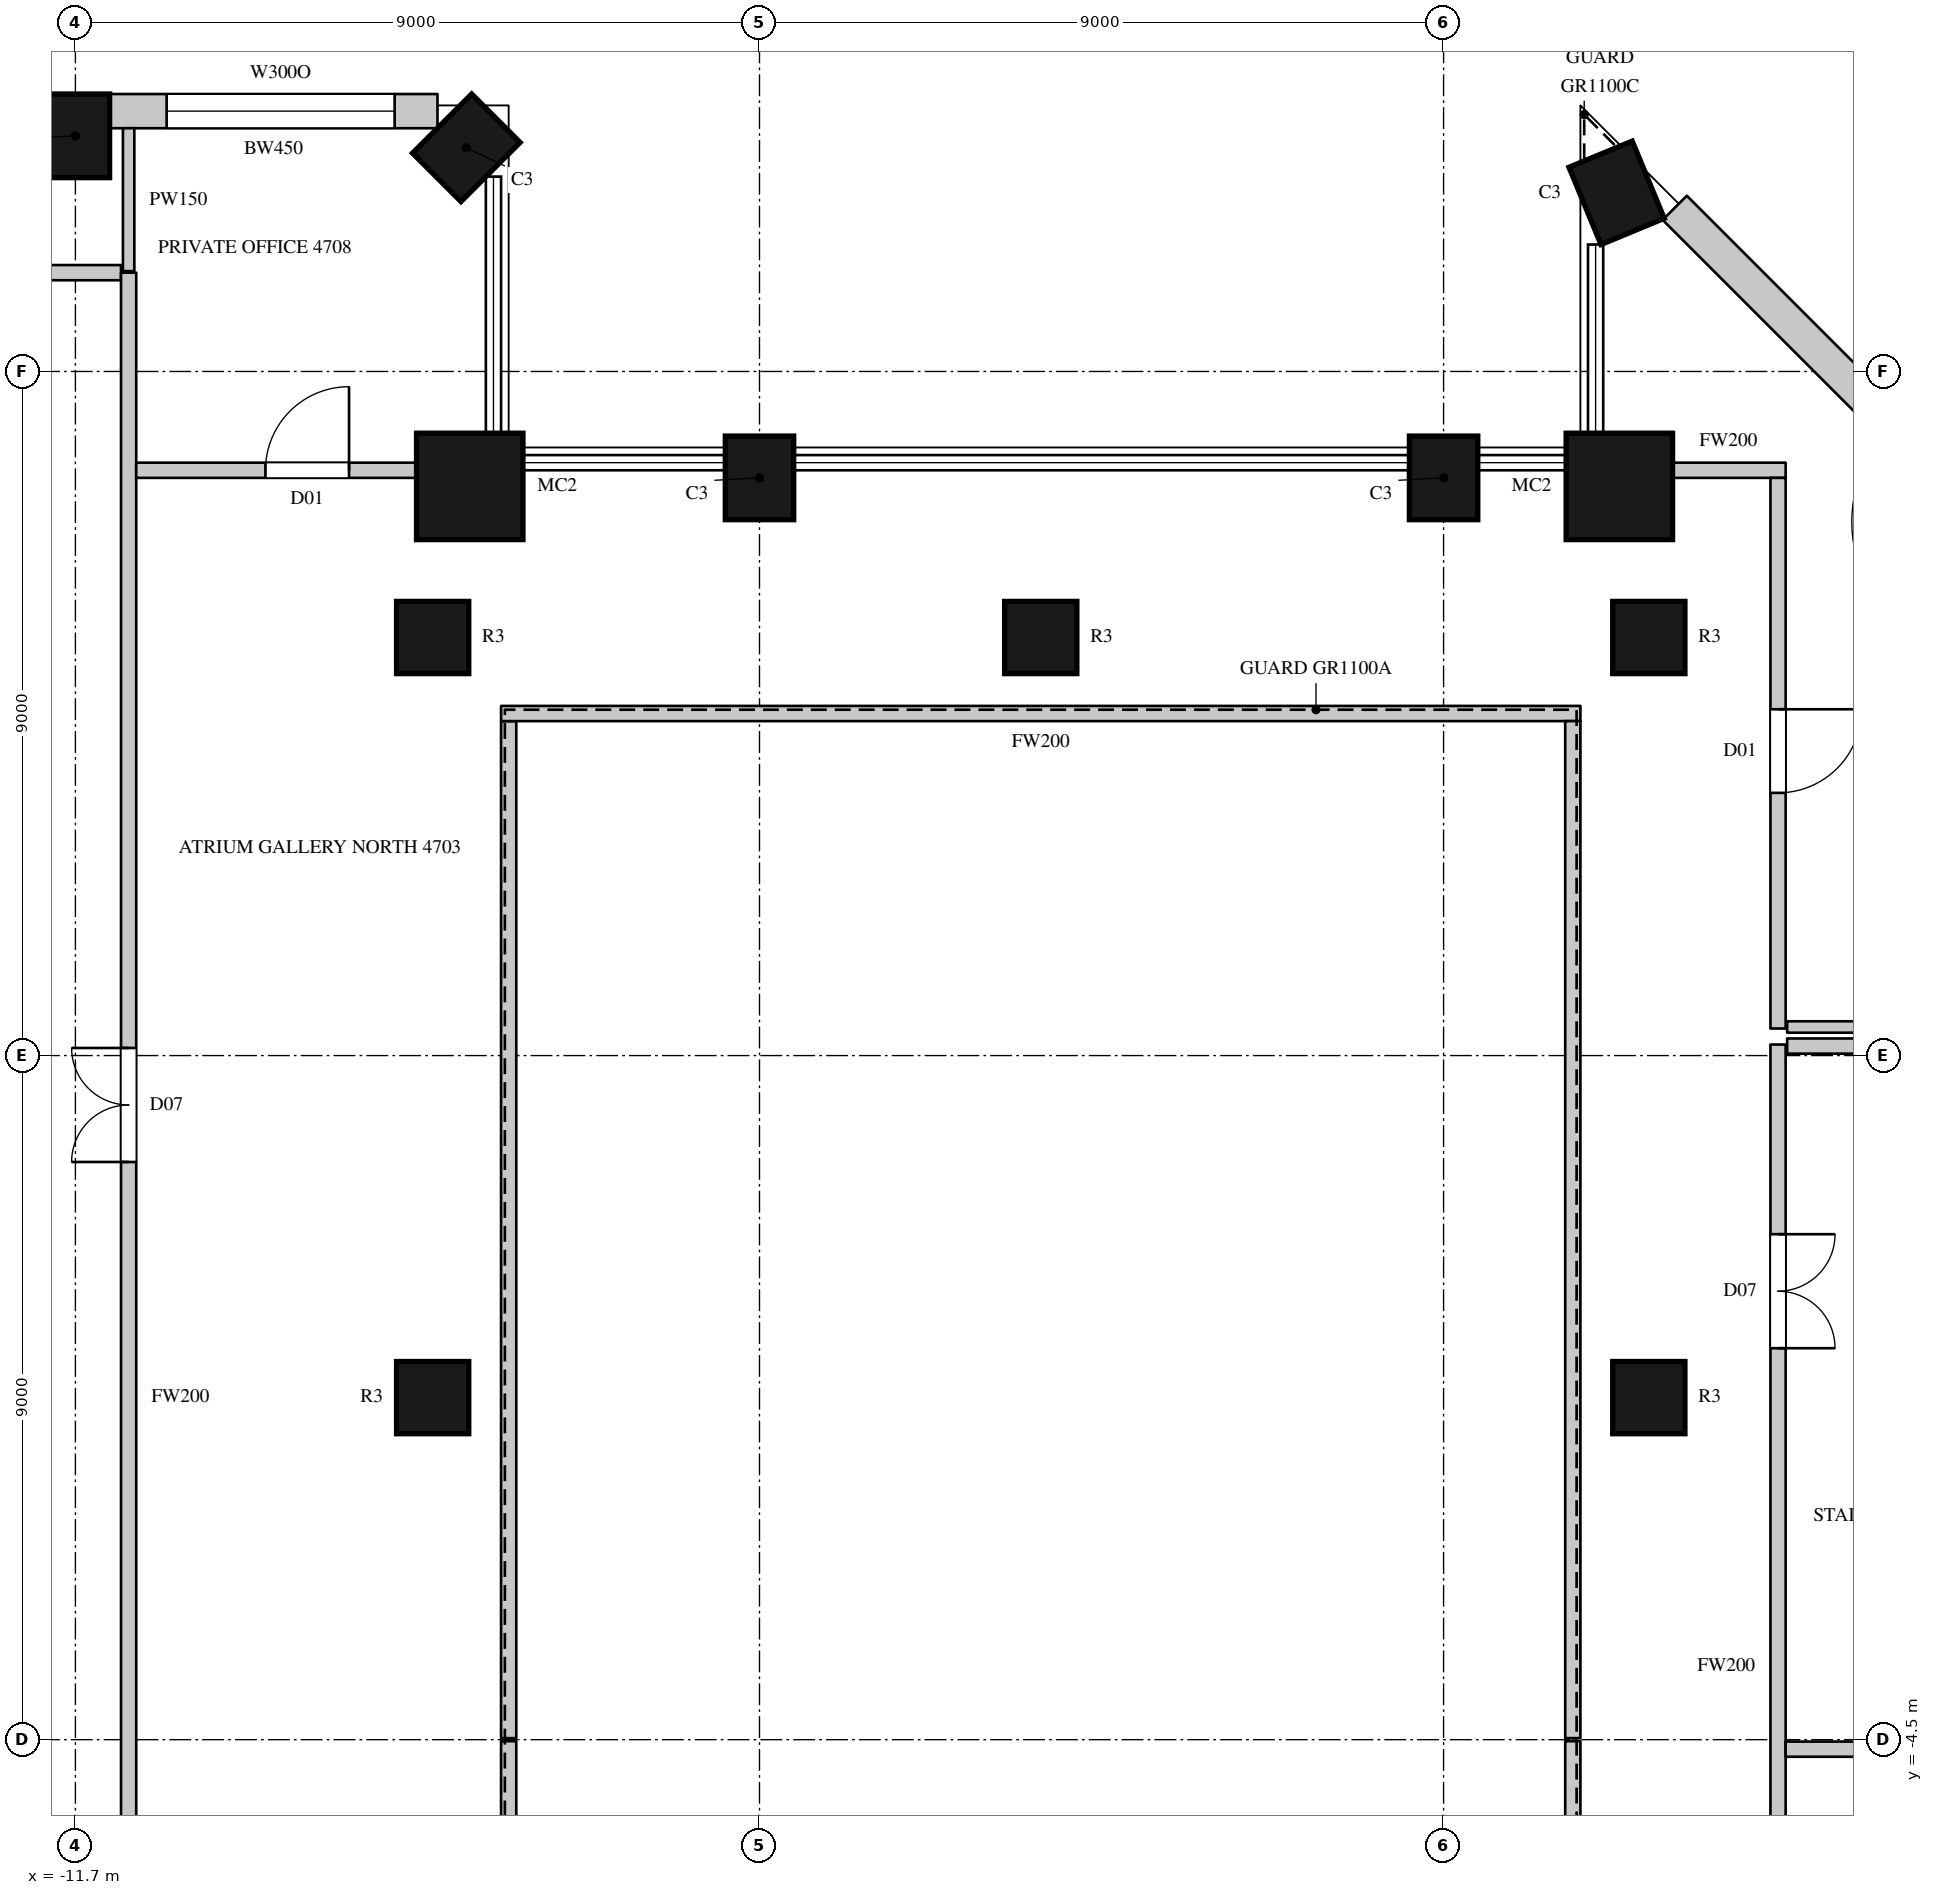
"""IFC4 building model, lengths in metres.
Left out: names, types, materials, properties, quantities, classifications, styles, units other than length and angle.
Written with IfcOpenShell. Run it as: python <this file> out.ifc"""

import sys

from ifc_helpers import new_model, si_unit, direction, frame, frame_2d, origin, origin_2d, place, context, subcontext, project, spatial, rectangle, circle, extrude, element, fill, save


model = new_model("IFC4")
c1 = context("Model", 3, precision=1e-05, world=origin(), true_north=direction((0.0, 1.0)))
c2 = subcontext(c1, "Body", "Model", "MODEL_VIEW")
j1 = project(units=[si_unit("LENGTHUNIT", "METRE"), si_unit("PLANEANGLEUNIT", "RADIAN")], contexts=[c1])
p1 = place(None, origin())
s1 = spatial("IfcSite", under=j1, at=p1, CompositionType="ELEMENT")
p2 = place(p1, origin())
s2 = spatial("IfcBuilding", under=s1, at=p2, CompositionType="ELEMENT")
p3 = place(p2, frame((0.0, 0.0, 213.8)))
s3 = spatial("IfcBuildingStorey", under=s2, at=p3, CompositionType="ELEMENT", Elevation=213.8)
p4 = place(p3, frame((8.576, 15.85, 0.0), z_axis=(0.0, 0.0, 1.0), x_axis=(-0.923879672772, -0.382683093746, 0.0)))
e1 = element("IfcColumn", 1, at=p4, inside=s3, PredefinedType="COLUMN", context=c2, shape_type="SweptSolid", body=[
    extrude(rectangle(XDim=0.9, YDim=1.1, at=origin_2d()), origin(), (0.0, 0.0, 1.0), 4.1),
])
p5 = place(p3, frame((8.612, 11.988, 0.0), z_axis=(0.0, 0.0, 1.0), x_axis=(1.0, 0.0, 0.0)))
e2 = element("IfcColumn", 2, at=p5, inside=s3, PredefinedType="COLUMN", context=c2, shape_type="SweptSolid", body=[
    extrude(circle(Radius=0.7, at=origin_2d()), origin(), (0.0, 0.0, 1.0), 4.1),
])
for number, where, z_axis, x_axis in (
    (3, (6.3, 12.1, 0.0), (0.0, 0.0, 1.0), (-1.0, 0.0, 0.0)),
    (4, (-2.7, 12.1, 0.0), (0.0, 0.0, 1.0), (-1.0, 0.0, 0.0)),
):
    element("IfcColumn", number, at=place(p3, frame(where, z_axis=z_axis, x_axis=x_axis)), inside=s3, PredefinedType="COLUMN", context=c2, shape_type="SweptSolid", body=[
        extrude(rectangle(XDim=0.9, YDim=1.1, at=origin_2d()), origin(), (0.0, 0.0, 1.0), 4.1),
    ])
p6 = place(p3, frame((-6.512, 11.988, 0.0), z_axis=(0.0, 0.0, 1.0), x_axis=(1.0, 0.0, 0.0)))
e5 = element("IfcColumn", 5, at=p6, inside=s3, PredefinedType="COLUMN", context=c2, shape_type="SweptSolid", body=[
    extrude(circle(Radius=0.7, at=origin_2d()), origin(), (0.0, 0.0, 1.0), 4.1),
])
for number, where, z_axis, x_axis in (
    (6, (-6.557, 16.443, 0.0), (0.0, 0.0, 1.0), (-0.707, 0.707, 0.0)),
    (7, (-11.7, 16.6, 0.0), (0.0, 0.0, 1.0), (-1.0, 0.0, 0.0)),
):
    element("IfcColumn", number, at=place(p3, frame(where, z_axis=z_axis, x_axis=x_axis)), inside=s3, PredefinedType="COLUMN", context=c2, shape_type="SweptSolid", body=[
        extrude(rectangle(XDim=0.9, YDim=1.1, at=origin_2d()), origin(), (0.0, 0.0, 1.0), 4.1),
    ])
for number, where, z_axis, x_axis in (
    (8, (-7.0, 0.0, 0.0), (0.0, 0.0, 1.0), (1.0, 0.0, 0.0)),
    (9, (-7.0, 10.0, 0.0), (0.0, 0.0, 1.0), (1.0, 0.0, 0.0)),
    (10, (1.0, 10.0, 0.0), (0.0, 0.0, 1.0), (1.0, 0.0, 0.0)),
    (11, (9.0, 0.0, 0.0), (0.0, 0.0, 1.0), (1.0, 0.0, 0.0)),
    (12, (9.0, 10.0, 0.0), (0.0, 0.0, 1.0), (1.0, 0.0, 0.0)),
):
    element("IfcColumn", number, at=place(p3, frame(where, z_axis=z_axis, x_axis=x_axis)), inside=s3, PredefinedType="COLUMN", context=c2, shape_type="SweptSolid", body=[
        extrude(circle(Radius=0.475, at=origin_2d()), origin(), (0.0, 0.0, 1.0), 4.1),
    ])
p7 = place(p3, frame((13.941, 11.053, 0.0), z_axis=(0.0, 0.0, 1.0), x_axis=(-0.707106781187, 0.707106781187, 0.0)))
e13 = element("IfcWall", 13, at=p7, inside=s3, PredefinedType="SOLIDWALL", context=c2, shape_type="SweptSolid", body=[
    extrude(rectangle(XDim=6.505, YDim=0.45, at=frame_2d((3.252, 0.0))), origin(), (0.0, 0.0, 1.0), 3.8),
])
p8 = place(p7, frame((0.665, 0.0, 0.0)))
e14 = element("IfcOpeningElement", 14, at=p8, cuts=e13, PredefinedType="OPENING", context=c2, shape_type="SweptSolid", body=[
    extrude(rectangle(XDim=1.8, YDim=2.4, at=frame_2d((0.9, 1.2))), frame((0.0, 0.235, 0.0), z_axis=(0.0, -1.0, 0.0), x_axis=(1.0, 0.0, 0.0)), (0.0, 0.0, 1.0), 0.47),
])
p9 = place(p3, frame((-6.936, 16.925, 0.0), z_axis=(0.0, 0.0, 1.0), x_axis=(-1.0, 0.0, 0.0)))
e15 = element("IfcWall", 15, at=p9, inside=s3, PredefinedType="SOLIDWALL", context=c2, shape_type="SweptSolid", body=[
    extrude(rectangle(XDim=4.314, YDim=0.45, at=frame_2d((2.157, 0.0))), origin(), (0.0, 0.0, 1.0), 3.8),
])
p10 = place(p9, frame((0.564, 0.0, 1.05)))
e16 = element("IfcOpeningElement", 16, at=p10, cuts=e15, PredefinedType="OPENING", context=c2, shape_type="SweptSolid", body=[
    extrude(rectangle(XDim=3.0, YDim=2.4, at=frame_2d((1.5, 1.2))), frame((0.0, 0.235, 0.0), z_axis=(0.0, -1.0, 0.0), x_axis=(1.0, 0.0, 0.0)), (0.0, 0.0, 1.0), 0.47),
])
p11 = place(p3, frame((-13.97, 14.8, 0.0), z_axis=(0.0, 0.0, 1.0), x_axis=(1.0, 0.0, 0.0)))
e17 = element("IfcWall", 17, at=p11, inside=s3, PredefinedType="PARTITIONING", context=c2, shape_type="SweptSolid", body=[
    extrude(rectangle(XDim=2.87, YDim=0.2, at=frame_2d((1.435, 0.0))), origin(), (0.0, 0.0, 1.0), 3.8),
])
p12 = place(p3, frame((-11.0, -14.8, 0.0), z_axis=(0.0, 0.0, 1.0), x_axis=(0.0, 1.0, 0.0)))
e18 = element("IfcWall", 18, at=p12, inside=s3, PredefinedType="PARTITIONING", context=c2, shape_type="SweptSolid", body=[
    extrude(rectangle(XDim=29.6, YDim=0.2, at=frame_2d((14.8, 0.0))), origin(), (0.0, 0.0, 1.0), 3.8),
])
p13 = place(p12, frame((17.9, 0.0, 0.0)))
e19 = element("IfcOpeningElement", 19, at=p13, cuts=e18, PredefinedType="OPENING", context=c2, shape_type="SweptSolid", body=[
    extrude(rectangle(XDim=1.5, YDim=2.4, at=frame_2d((0.75, 1.2))), frame((0.0, 0.11, 0.0), z_axis=(0.0, -1.0, 0.0), x_axis=(1.0, 0.0, 0.0)), (0.0, 0.0, 1.0), 0.22),
])
p14 = place(p3, frame((-10.9, 12.2, 0.0), z_axis=(0.0, 0.0, 1.0), x_axis=(1.0, 0.0, 0.0)))
e20 = element("IfcWall", 20, at=p14, inside=s3, PredefinedType="PARTITIONING", context=c2, shape_type="SweptSolid", body=[
    extrude(rectangle(XDim=3.704, YDim=0.2, at=frame_2d((1.852, 0.0))), origin(), (0.0, 0.0, 1.0), 3.8),
])
p15 = place(p14, frame((1.7, 0.0, 0.0)))
e21 = element("IfcOpeningElement", 21, at=p15, cuts=e20, PredefinedType="OPENING", context=c2, shape_type="SweptSolid", body=[
    extrude(rectangle(XDim=1.1, YDim=2.4, at=frame_2d((0.55, 1.2))), frame((0.0, 0.11, 0.0), z_axis=(0.0, -1.0, 0.0), x_axis=(1.0, 0.0, 0.0)), (0.0, 0.0, 1.0), 0.22),
])
p16 = place(p3, frame((-6.0, -8.9, 0.0), z_axis=(0.0, 0.0, 1.0), x_axis=(0.0, 1.0, 0.0)))
e22 = element("IfcWall", 22, at=p16, inside=s3, PredefinedType="PARTITIONING", context=c2, shape_type="SweptSolid", body=[
    extrude(rectangle(XDim=4.38, YDim=0.2, at=frame_2d((2.19, 0.0))), origin(), (0.0, 0.0, 1.0), 3.8),
])
p17 = place(p3, frame((-6.0, -4.48, 0.0), z_axis=(0.0, 0.0, 1.0), x_axis=(0.0, 1.0, 0.0)))
e23 = element("IfcWall", 23, at=p17, inside=s3, PredefinedType="PARTITIONING", context=c2, shape_type="SweptSolid", body=[
    extrude(rectangle(XDim=13.38, YDim=0.2, at=frame_2d((6.69, 0.0))), origin(), (0.0, 0.0, 1.0), 3.8),
])
p18 = place(p3, frame((-6.1, 9.0, 0.0), z_axis=(0.0, 0.0, 1.0), x_axis=(1.0, 0.0, 0.0)))
e24 = element("IfcWall", 24, at=p18, inside=s3, PredefinedType="PARTITIONING", context=c2, shape_type="SweptSolid", body=[
    extrude(rectangle(XDim=14.2, YDim=0.2, at=frame_2d((7.1, 0.0))), origin(), (0.0, 0.0, 1.0), 3.8),
])
p19 = place(p3, frame((8.0, -8.9, 0.0), z_axis=(0.0, 0.0, 1.0), x_axis=(0.0, 1.0, 0.0)))
e25 = element("IfcWall", 25, at=p19, inside=s3, PredefinedType="PARTITIONING", context=c2, shape_type="SweptSolid", body=[
    extrude(rectangle(XDim=4.38, YDim=0.2, at=frame_2d((2.19, 0.0))), origin(), (0.0, 0.0, 1.0), 3.8),
])
p20 = place(p3, frame((8.0, -4.48, 0.0), z_axis=(0.0, 0.0, 1.0), x_axis=(0.0, 1.0, 0.0)))
e26 = element("IfcWall", 26, at=p20, inside=s3, PredefinedType="PARTITIONING", context=c2, shape_type="SweptSolid", body=[
    extrude(rectangle(XDim=13.38, YDim=0.2, at=frame_2d((6.69, 0.0))), origin(), (0.0, 0.0, 1.0), 3.8),
])
p21 = place(p3, frame((9.296, 12.2, 0.0), z_axis=(0.0, 0.0, 1.0), x_axis=(1.0, 0.0, 0.0)))
e27 = element("IfcWall", 27, at=p21, inside=s3, PredefinedType="PARTITIONING", context=c2, shape_type="SweptSolid", body=[
    extrude(rectangle(XDim=1.504, YDim=0.2, at=frame_2d((0.752, 0.0))), origin(), (0.0, 0.0, 1.0), 3.8),
])
p22 = place(p3, frame((10.7, -11.7, 0.0), z_axis=(0.0, 0.0, 1.0), x_axis=(0.0, 1.0, 0.0)))
e28 = element("IfcWall", 28, at=p22, inside=s3, PredefinedType="PARTITIONING", context=c2, shape_type="SweptSolid", body=[
    extrude(rectangle(XDim=16.345, YDim=0.2, at=frame_2d((8.172, 0.0))), origin(), (0.0, 0.0, 1.0), 3.8),
])
p23 = place(p22, frame((12.35, 0.0, 0.0)))
e29 = element("IfcOpeningElement", 29, at=p23, cuts=e28, PredefinedType="OPENING", context=c2, shape_type="SweptSolid", body=[
    extrude(rectangle(XDim=1.5, YDim=2.4, at=frame_2d((0.75, 1.2))), frame((0.0, 0.11, 0.0), z_axis=(0.0, -1.0, 0.0), x_axis=(1.0, 0.0, 0.0)), (0.0, 0.0, 1.0), 0.22),
])
p24 = place(p22, frame((3.0, 0.0, 0.0)))
e30 = element("IfcOpeningElement", 30, at=p24, cuts=e28, PredefinedType="OPENING", context=c2, shape_type="SweptSolid", body=[
    extrude(rectangle(XDim=1.1, YDim=2.4, at=frame_2d((0.55, 1.2))), frame((0.0, 0.11, 0.0), z_axis=(0.0, -1.0, 0.0), x_axis=(1.0, 0.0, 0.0)), (0.0, 0.0, 1.0), 0.22),
])
p25 = place(p3, frame((10.8, -4.625, 0.0), z_axis=(0.0, 0.0, 1.0), x_axis=(1.0, 0.0, 0.0)))
e31 = element("IfcWall", 31, at=p25, inside=s3, PredefinedType="PARTITIONING", context=c2, shape_type="SweptSolid", body=[
    extrude(rectangle(XDim=3.875, YDim=0.2, at=frame_2d((1.938, 0.0))), origin(), (0.0, 0.0, 1.0), 3.8),
])
p26 = place(p3, frame((10.7, 4.856, 0.0), z_axis=(0.0, 0.0, 1.0), x_axis=(0.0, 1.0, 0.0)))
e32 = element("IfcWall", 32, at=p26, inside=s3, PredefinedType="PARTITIONING", context=c2, shape_type="SweptSolid", body=[
    extrude(rectangle(XDim=7.244, YDim=0.2, at=frame_2d((3.622, 0.0))), origin(), (0.0, 0.0, 1.0), 3.8),
])
p27 = place(p26, frame((3.1, 0.0, 0.0)))
e33 = element("IfcOpeningElement", 33, at=p27, cuts=e32, PredefinedType="OPENING", context=c2, shape_type="SweptSolid", body=[
    extrude(rectangle(XDim=1.1, YDim=2.4, at=frame_2d((0.55, 1.2))), frame((0.0, 0.11, 0.0), z_axis=(0.0, -1.0, 0.0), x_axis=(1.0, 0.0, 0.0)), (0.0, 0.0, 1.0), 0.22),
])
p28 = place(p3, frame((10.82, 4.625, 0.0), z_axis=(0.0, 0.0, 1.0), x_axis=(1.0, 0.0, 0.0)))
e34 = element("IfcWall", 34, at=p28, inside=s3, PredefinedType="PARTITIONING", context=c2, shape_type="SweptSolid", body=[
    extrude(rectangle(XDim=3.835, YDim=0.2, at=frame_2d((1.917, 0.0))), origin(), (0.0, 0.0, 1.0), 3.8),
])
p29 = place(p3, frame((-11.0, 14.82, 0.0), z_axis=(0.0, 0.0, 1.0), x_axis=(0.0, 1.0, 0.0)))
e35 = element("IfcWall", 35, at=p29, inside=s3, PredefinedType="PARTITIONING", context=c2, shape_type="SweptSolid", body=[
    extrude(rectangle(XDim=1.88, YDim=0.15, at=frame_2d((0.94, 0.0))), origin(), (0.0, 0.0, 1.0), 3.8),
])
p30 = place(p3, frame((10.82, 4.876, 0.0), z_axis=(0.0, 0.0, 1.0), x_axis=(1.0, 0.0, 0.0)))
e36 = element("IfcWall", 36, at=p30, inside=s3, PredefinedType="PARTITIONING", context=c2, shape_type="SweptSolid", body=[
    extrude(rectangle(XDim=8.095, YDim=0.15, at=frame_2d((4.047, 0.0))), origin(), (0.0, 0.0, 1.0), 3.8),
])
p31 = place(p10, origin())
e37 = element("IfcWindow", 37, at=p31, inside=s3, PartitioningType="SINGLE_PANEL", PredefinedType="WINDOW", context=c2, shape_type="SweptSolid", body=[
    extrude(rectangle(XDim=3.0, YDim=2.4, at=frame_2d((1.5, 1.2))), frame((0.0, 0.135, 0.0), z_axis=(0.0, -1.0, 0.0), x_axis=(1.0, 0.0, 0.0)), (0.0, 0.0, 1.0), 0.06),
])
fill(e16, e37)
p32 = place(p13, origin())
e38 = element("IfcDoor", 38, at=p32, inside=s3, OperationType="DOUBLE_DOOR_SINGLE_SWING", PredefinedType="DOOR", context=c2, shape_type="SweptSolid", body=[
    extrude(rectangle(XDim=1.5, YDim=2.4, at=frame_2d((0.75, 1.2))), frame((0.0, 0.025, 0.0), z_axis=(0.0, -1.0, 0.0), x_axis=(1.0, 0.0, 0.0)), (0.0, 0.0, 1.0), 0.05),
])
fill(e19, e38)
p33 = place(p23, origin())
e39 = element("IfcDoor", 39, at=p33, inside=s3, OperationType="DOUBLE_DOOR_SINGLE_SWING", PredefinedType="DOOR", context=c2, shape_type="SweptSolid", body=[
    extrude(rectangle(XDim=1.5, YDim=2.4, at=frame_2d((0.75, 1.2))), frame((0.0, 0.025, 0.0), z_axis=(0.0, -1.0, 0.0), x_axis=(1.0, 0.0, 0.0)), (0.0, 0.0, 1.0), 0.05),
])
fill(e29, e39)
p34 = place(p15, origin())
e40 = element("IfcDoor", 40, at=p34, inside=s3, OperationType="SINGLE_SWING_RIGHT", PredefinedType="DOOR", context=c2, shape_type="SweptSolid", body=[
    extrude(rectangle(XDim=1.1, YDim=2.4, at=frame_2d((0.55, 1.2))), frame((0.0, 0.025, 0.0), z_axis=(0.0, -1.0, 0.0), x_axis=(1.0, 0.0, 0.0)), (0.0, 0.0, 1.0), 0.05),
])
fill(e21, e40)
p35 = place(p27, origin())
e41 = element("IfcDoor", 41, at=p35, inside=s3, OperationType="SINGLE_SWING_LEFT", PredefinedType="DOOR", context=c2, shape_type="SweptSolid", body=[
    extrude(rectangle(XDim=1.1, YDim=2.4, at=frame_2d((0.55, 1.2))), frame((0.0, 0.025, 0.0), z_axis=(0.0, -1.0, 0.0), x_axis=(1.0, 0.0, 0.0)), (0.0, 0.0, 1.0), 0.05),
])
fill(e33, e41)
save(model, sys.argv[1])
